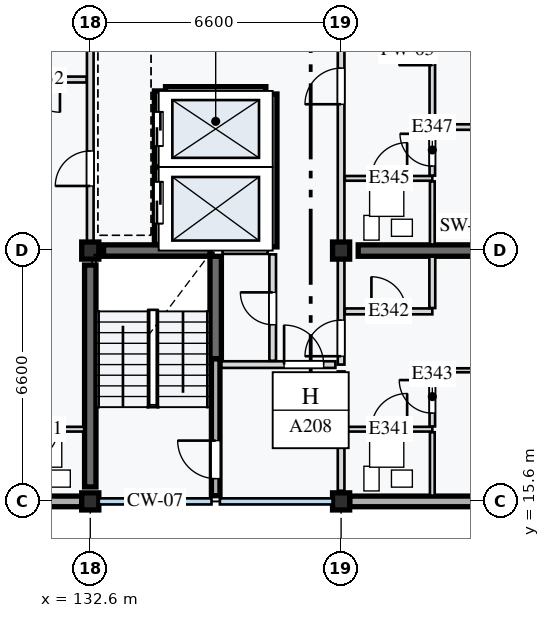
"""IFC4 building model, lengths in metres.
Left out: names, types, materials, properties, quantities, classifications, styles, units other than length and angle.
Written with IfcOpenShell. Run it as: python <this file> out.ifc"""

import sys

from ifc_helpers import new_model, si_unit, direction, frame, frame_2d, origin, origin_2d, place, context, subcontext, project, spatial, rectangle, extrude, element, fill, save


model = new_model("IFC4")
c1 = context("Model", 3, precision=1e-05, world=origin(), true_north=direction((0.0, 1.0)))
c2 = subcontext(c1, "Body", "Model", "MODEL_VIEW")
j1 = project(units=[si_unit("LENGTHUNIT", "METRE"), si_unit("PLANEANGLEUNIT", "RADIAN")], contexts=[c1])
p1 = place(None, origin())
s1 = spatial("IfcSite", under=j1, at=p1, CompositionType="ELEMENT")
p2 = place(p1, origin())
s2 = spatial("IfcBuilding", under=s1, at=p2, CompositionType="ELEMENT")
p3 = place(p2, frame((0.0, 0.0, 27.6)))
s3 = spatial("IfcBuildingStorey", under=s2, at=p3, CompositionType="ELEMENT", Elevation=27.6)
for number, where, z_axis, x_axis in (
    (1, (132.6, 15.6, 0.0), (0.0, 0.0, 1.0), (1.0, 0.0, 0.0)),
    (2, (139.2, 15.6, 0.0), (0.0, 0.0, 1.0), (1.0, 0.0, 0.0)),
    (3, (132.6, 22.2, 0.0), (0.0, 0.0, 1.0), (1.0, 0.0, 0.0)),
    (4, (139.2, 22.2, 0.0), (0.0, 0.0, 1.0), (1.0, 0.0, 0.0)),
):
    element("IfcColumn", number, at=place(p3, frame(where, z_axis=z_axis, x_axis=x_axis)), inside=s3, PredefinedType="COLUMN", context=c2, shape_type="SweptSolid", body=[
        extrude(rectangle(XDim=0.45, YDim=0.45, at=origin_2d()), origin(), (0.0, 0.0, 1.0), 3.2),
    ])
p4 = place(p3, frame((132.6, 15.98, 0.0), z_axis=(0.0, 0.0, 1.0), x_axis=(0.0, 1.0, 0.0)))
e5 = element("IfcWall", 5, at=p4, inside=s3, PredefinedType="SHEAR", context=c2, shape_type="SweptSolid", body=[
    extrude(rectangle(XDim=5.84, YDim=0.3, at=frame_2d((2.92, 0.0))), origin(), (0.0, 0.0, 1.0), 2.97),
])
p5 = place(p3, frame((135.9, 19.35, 0.0), z_axis=(0.0, 0.0, 1.0), x_axis=(0.0, 1.0, 0.0)))
e6 = element("IfcWall", 6, at=p5, inside=s3, PredefinedType="SHEAR", context=c2, shape_type="SweptSolid", body=[
    extrude(rectangle(XDim=2.7, YDim=0.3, at=frame_2d((1.35, 0.0))), origin(), (0.0, 0.0, 1.0), 2.97),
])
p6 = place(p3, frame((132.95, 22.2, 0.0), z_axis=(0.0, 0.0, 1.0), x_axis=(1.0, 0.0, 0.0)))
e7 = element("IfcWall", 7, at=p6, inside=s3, PredefinedType="SHEAR", context=c2, shape_type="SweptSolid", body=[
    extrude(rectangle(XDim=2.8, YDim=0.3, at=frame_2d((1.4, 0.0))), origin(), (0.0, 0.0, 1.0), 2.97),
])
p7 = place(p3, frame((139.65, 22.2, 0.0), z_axis=(0.0, 0.0, 1.0), x_axis=(1.0, 0.0, 0.0)))
e8 = element("IfcWall", 8, at=p7, inside=s3, PredefinedType="SHEAR", context=c2, shape_type="SweptSolid", body=[
    extrude(rectangle(XDim=5.7, YDim=0.3, at=frame_2d((2.85, 0.0))), origin(), (0.0, 0.0, 1.0), 2.97),
])
for number, where, z_axis, x_axis in (
    (9, (126.225, 15.6, 0.0), (0.0, 0.0, 1.0), (1.0, 0.0, 0.0)),
    (10, (139.425, 15.6, 0.0), (0.0, 0.0, 1.0), (1.0, 0.0, 0.0)),
):
    element("IfcWall", number, at=place(p3, frame(where, z_axis=z_axis, x_axis=x_axis)), inside=s3, PredefinedType="STANDARD", context=c2, shape_type="SweptSolid", body=[
        extrude(rectangle(XDim=6.15, YDim=0.28, at=frame_2d((3.075, 0.0))), origin(), (0.0, 0.0, 1.0), 2.65),
    ])
p8 = place(p3, frame((135.9, 15.75, 0.0), z_axis=(0.0, 0.0, 1.0), x_axis=(0.0, 1.0, 0.0)))
e11 = element("IfcWall", 11, at=p8, inside=s3, PredefinedType="STANDARD", context=c2, shape_type="SweptSolid", body=[
    extrude(rectangle(XDim=3.6, YDim=0.225, at=frame_2d((1.8, 0.0))), origin(), (0.0, 0.0, 1.0), 2.97),
])
p9 = place(p8, frame((0.45, 0.0, 0.0)))
e12 = element("IfcOpeningElement", 12, at=p9, cuts=e11, PredefinedType="OPENING", context=c2, shape_type="SweptSolid", body=[
    extrude(rectangle(XDim=1.0, YDim=2.16, at=frame_2d((0.5, 1.08))), frame((0.0, 0.123, 0.0), z_axis=(0.0, -1.0, 0.0), x_axis=(1.0, 0.0, 0.0)), (0.0, 0.0, 1.0), 0.245),
])
p10 = place(p3, frame((136.05, 19.2, 0.0), z_axis=(0.0, 0.0, 1.0), x_axis=(1.0, 0.0, 0.0)))
e13 = element("IfcWall", 13, at=p10, inside=s3, PredefinedType="PARTITIONING", context=c2, shape_type="SweptSolid", body=[
    extrude(rectangle(XDim=3.0, YDim=0.175, at=frame_2d((1.5, 0.0))), origin(), (0.0, 0.0, 1.0), 2.97),
])
p11 = place(p10, frame((1.65, 0.0, 0.0)))
e14 = element("IfcOpeningElement", 14, at=p11, cuts=e13, PredefinedType="OPENING", context=c2, shape_type="SweptSolid", body=[
    extrude(rectangle(XDim=1.04, YDim=2.12, at=frame_2d((0.52, 1.06))), frame((0.0, 0.097, 0.0), z_axis=(0.0, -1.0, 0.0), x_axis=(1.0, 0.0, 0.0)), (0.0, 0.0, 1.0), 0.195),
])
p12 = place(p3, frame((137.4, 19.3, 0.0), z_axis=(0.0, 0.0, 1.0), x_axis=(0.0, 1.0, 0.0)))
e15 = element("IfcWall", 15, at=p12, inside=s3, PredefinedType="PARTITIONING", context=c2, shape_type="SweptSolid", body=[
    extrude(rectangle(XDim=2.8, YDim=0.175, at=frame_2d((1.4, 0.0))), origin(), (0.0, 0.0, 1.0), 2.97),
])
p13 = place(p12, frame((0.95, 0.0, 0.0)))
e16 = element("IfcOpeningElement", 16, at=p13, cuts=e15, PredefinedType="OPENING", context=c2, shape_type="SweptSolid", body=[
    extrude(rectangle(XDim=0.85, YDim=2.0, at=frame_2d((0.425, 1.0))), frame((0.0, 0.097, 0.0), z_axis=(0.0, -1.0, 0.0), x_axis=(1.0, 0.0, 0.0)), (0.0, 0.0, 1.0), 0.195),
])
p14 = place(p3, frame((136.08, 22.2, 0.0), z_axis=(0.0, 0.0, 1.0), x_axis=(1.0, 0.0, 0.0)))
e17 = element("IfcWall", 17, at=p14, inside=s3, PredefinedType="PARTITIONING", context=c2, shape_type="SweptSolid", body=[
    extrude(rectangle(XDim=1.19, YDim=0.175, at=frame_2d((0.595, 0.0))), origin(), (0.0, 0.0, 1.0), 2.97),
])
p15 = place(p3, frame((134.4, 22.36, 0.0), z_axis=(0.0, 0.0, 1.0), x_axis=(0.0, 1.0, 0.0)))
e18 = element("IfcWall", 18, at=p15, inside=s3, PredefinedType="STANDARD", context=c2, shape_type="SweptSolid", body=[
    extrude(rectangle(XDim=2.04, YDim=0.225, at=frame_2d((1.02, 0.0))), origin(), (0.0, 0.0, 1.0), 2.97),
])
p16 = place(p15, frame((0.55, 0.0, 0.0)))
e19 = element("IfcOpeningElement", 19, at=p16, cuts=e18, PredefinedType="OPENING", context=c2, shape_type="SweptSolid", body=[
    extrude(rectangle(XDim=1.1, YDim=2.1, at=frame_2d((0.55, 1.05))), frame((0.0, 0.123, 0.0), z_axis=(0.0, -1.0, 0.0), x_axis=(1.0, 0.0, 0.0)), (0.0, 0.0, 1.0), 0.245),
])
p17 = place(p3, frame((134.4, 24.4, 0.0), z_axis=(0.0, 0.0, 1.0), x_axis=(0.0, 1.0, 0.0)))
e20 = element("IfcWall", 20, at=p17, inside=s3, PredefinedType="STANDARD", context=c2, shape_type="SweptSolid", body=[
    extrude(rectangle(XDim=2.0, YDim=0.225, at=frame_2d((1.0, 0.0))), origin(), (0.0, 0.0, 1.0), 2.97),
])
p18 = place(p17, frame((0.55, 0.0, 0.0)))
e21 = element("IfcOpeningElement", 21, at=p18, cuts=e20, PredefinedType="OPENING", context=c2, shape_type="SweptSolid", body=[
    extrude(rectangle(XDim=0.9, YDim=2.1, at=frame_2d((0.45, 1.05))), frame((0.0, 0.123, 0.0), z_axis=(0.0, -1.0, 0.0), x_axis=(1.0, 0.0, 0.0)), (0.0, 0.0, 1.0), 0.245),
])
p19 = place(p3, frame((137.4, 22.298, 0.0), z_axis=(0.0, 0.0, 1.0), x_axis=(0.0, 1.0, 0.0)))
e22 = element("IfcWall", 22, at=p19, inside=s3, PredefinedType="STANDARD", context=c2, shape_type="SweptSolid", body=[
    extrude(rectangle(XDim=4.022, YDim=0.225, at=frame_2d((2.011, 0.0))), origin(), (0.0, 0.0, 1.0), 2.97),
])
for number, where, z_axis, x_axis in (
    (23, (134.58, 24.4, 0.0), (0.0, 0.0, 1.0), (1.0, 0.0, 0.0)),
    (24, (134.58, 26.4, 0.0), (0.0, 0.0, 1.0), (1.0, 0.0, 0.0)),
):
    element("IfcWall", number, at=place(p3, frame(where, z_axis=z_axis, x_axis=x_axis)), inside=s3, PredefinedType="STANDARD", context=c2, shape_type="SweptSolid", body=[
        extrude(rectangle(XDim=2.64, YDim=0.225, at=frame_2d((1.32, 0.0))), origin(), (0.0, 0.0, 1.0), 2.97),
    ])
p20 = place(p3, frame((132.6, 22.2, 0.0), z_axis=(0.0, 0.0, 1.0), x_axis=(0.0, 1.0, 0.0)))
e25 = element("IfcWall", 25, at=p20, inside=s3, PredefinedType="PARTITIONING", context=c2, shape_type="SweptSolid", body=[
    extrude(rectangle(XDim=6.6, YDim=0.175, at=frame_2d((3.3, 0.0))), origin(), (0.0, 0.0, 1.0), 2.55),
])
p21 = place(p20, frame((1.7, 0.0, 0.0)))
e26 = element("IfcOpeningElement", 26, at=p21, cuts=e25, PredefinedType="OPENING", context=c2, shape_type="SweptSolid", body=[
    extrude(rectangle(XDim=0.92, YDim=2.14, at=frame_2d((0.46, 1.07))), frame((0.0, 0.097, 0.0), z_axis=(0.0, -1.0, 0.0), x_axis=(1.0, 0.0, 0.0)), (0.0, 0.0, 1.0), 0.195),
])
p22 = place(p3, frame((132.44, 17.5, 0.0), z_axis=(0.0, 0.0, 1.0), x_axis=(-1.0, 0.0, 0.0)))
e27 = element("IfcWall", 27, at=p22, inside=s3, PredefinedType="PARTITIONING", context=c2, shape_type="SweptSolid", body=[
    extrude(rectangle(XDim=2.24, YDim=0.125, at=frame_2d((1.12, 0.0))), origin(), (0.0, 0.0, 1.0), 2.97),
])
p23 = place(p22, frame((0.7, 0.0, 0.0)))
e28 = element("IfcOpeningElement", 28, at=p23, cuts=e27, PredefinedType="OPENING", context=c2, shape_type="SweptSolid", body=[
    extrude(rectangle(XDim=0.82, YDim=2.05, at=frame_2d((0.41, 1.025))), frame((0.0, 0.073, 0.0), z_axis=(0.0, -1.0, 0.0), x_axis=(1.0, 0.0, 0.0)), (0.0, 0.0, 1.0), 0.145),
])
p24 = place(p3, frame((132.502, 26.7, 0.0), z_axis=(0.0, 0.0, 1.0), x_axis=(-1.0, 0.0, 0.0)))
e29 = element("IfcWall", 29, at=p24, inside=s3, PredefinedType="PARTITIONING", context=c2, shape_type="SweptSolid", body=[
    extrude(rectangle(XDim=2.302, YDim=0.155, at=frame_2d((1.151, 0.0))), origin(), (0.0, 0.0, 1.0), 2.97),
])
p25 = place(p24, frame((0.7, 0.0, 0.0)))
e30 = element("IfcOpeningElement", 30, at=p25, cuts=e29, PredefinedType="OPENING", context=c2, shape_type="SweptSolid", body=[
    extrude(rectangle(XDim=0.86, YDim=2.12, at=frame_2d((0.43, 1.06))), frame((0.0, 0.087, 0.0), z_axis=(0.0, -1.0, 0.0), x_axis=(1.0, 0.0, 0.0)), (0.0, 0.0, 1.0), 0.175),
])
p26 = place(p3, frame((139.2, 15.88, 0.0), z_axis=(0.0, 0.0, 1.0), x_axis=(0.0, 1.0, 0.0)))
e31 = element("IfcWall", 31, at=p26, inside=s3, PredefinedType="PARTITIONING", context=c2, shape_type="SweptSolid", body=[
    extrude(rectangle(XDim=3.14, YDim=0.175, at=frame_2d((1.57, 0.0))), origin(), (0.0, 0.0, 1.0), 2.55),
])
p27 = place(p3, frame((139.2, 19.2, 0.0), z_axis=(0.0, 0.0, 1.0), x_axis=(0.0, 1.0, 0.0)))
e32 = element("IfcWall", 32, at=p27, inside=s3, PredefinedType="PARTITIONING", context=c2, shape_type="SweptSolid", body=[
    extrude(rectangle(XDim=3.0, YDim=0.175, at=frame_2d((1.5, 0.0))), origin(), (0.0, 0.0, 1.0), 2.55),
])
p28 = place(p27, frame((0.22, 0.0, 0.0)))
e33 = element("IfcOpeningElement", 33, at=p28, cuts=e32, PredefinedType="OPENING", context=c2, shape_type="SweptSolid", body=[
    extrude(rectangle(XDim=0.95, YDim=2.1, at=frame_2d((0.475, 1.05))), frame((0.0, 0.097, 0.0), z_axis=(0.0, -1.0, 0.0), x_axis=(1.0, 0.0, 0.0)), (0.0, 0.0, 1.0), 0.195),
])
p29 = place(p3, frame((139.298, 17.5, 0.0), z_axis=(0.0, 0.0, 1.0), x_axis=(1.0, 0.0, 0.0)))
e34 = element("IfcWall", 34, at=p29, inside=s3, PredefinedType="PARTITIONING", context=c2, shape_type="SweptSolid", body=[
    extrude(rectangle(XDim=2.302, YDim=0.125, at=frame_2d((1.151, 0.0))), origin(), (0.0, 0.0, 1.0), 2.97),
])
p30 = place(p29, frame((0.7, 0.0, 0.0)))
e35 = element("IfcOpeningElement", 35, at=p30, cuts=e34, PredefinedType="OPENING", context=c2, shape_type="SweptSolid", body=[
    extrude(rectangle(XDim=0.94, YDim=2.08, at=frame_2d((0.47, 1.04))), frame((0.0, 0.073, 0.0), z_axis=(0.0, -1.0, 0.0), x_axis=(1.0, 0.0, 0.0)), (0.0, 0.0, 1.0), 0.145),
])
p31 = place(p3, frame((141.6, 15.75, 0.0), z_axis=(0.0, 0.0, 1.0), x_axis=(0.0, 1.0, 0.0)))
e36 = element("IfcWall", 36, at=p31, inside=s3, PredefinedType="PARTITIONING", context=c2, shape_type="SweptSolid", body=[
    extrude(rectangle(XDim=1.67, YDim=0.125, at=frame_2d((0.835, 0.0))), origin(), (0.0, 0.0, 1.0), 2.97),
])
p32 = place(p3, frame((139.298, 20.6, 0.0), z_axis=(0.0, 0.0, 1.0), x_axis=(1.0, 0.0, 0.0)))
e37 = element("IfcWall", 37, at=p32, inside=s3, PredefinedType="PARTITIONING", context=c2, shape_type="SweptSolid", body=[
    extrude(rectangle(XDim=2.302, YDim=0.155, at=frame_2d((1.151, 0.0))), origin(), (0.0, 0.0, 1.0), 2.97),
])
p33 = place(p32, frame((0.7, 0.0, 0.0)))
e38 = element("IfcOpeningElement", 38, at=p33, cuts=e37, PredefinedType="OPENING", context=c2, shape_type="SweptSolid", body=[
    extrude(rectangle(XDim=0.91, YDim=2.14, at=frame_2d((0.455, 1.07))), frame((0.0, 0.087, 0.0), z_axis=(0.0, -1.0, 0.0), x_axis=(1.0, 0.0, 0.0)), (0.0, 0.0, 1.0), 0.175),
])
p34 = place(p3, frame((141.6, 20.688, 0.0), z_axis=(0.0, 0.0, 1.0), x_axis=(0.0, 1.0, 0.0)))
e39 = element("IfcWall", 39, at=p34, inside=s3, PredefinedType="PARTITIONING", context=c2, shape_type="SweptSolid", body=[
    extrude(rectangle(XDim=1.353, YDim=0.155, at=frame_2d((0.676, 0.0))), origin(), (0.0, 0.0, 1.0), 2.97),
])
p35 = place(p3, frame((141.6, 17.573, 0.0), z_axis=(0.0, 0.0, 1.0), x_axis=(0.0, 1.0, 0.0)))
e40 = element("IfcWall", 40, at=p35, inside=s3, PredefinedType="PARTITIONING", context=c2, shape_type="SweptSolid", body=[
    extrude(rectangle(XDim=1.478, YDim=0.145, at=frame_2d((0.739, 0.0))), origin(), (0.0, 0.0, 1.0), 2.97),
])
p36 = place(p35, frame((0.35, 0.0, 0.0)))
e41 = element("IfcOpeningElement", 41, at=p36, cuts=e40, PredefinedType="OPENING", context=c2, shape_type="SweptSolid", body=[
    extrude(rectangle(XDim=0.87, YDim=2.08, at=frame_2d((0.435, 1.04))), frame((0.0, 0.083, 0.0), z_axis=(0.0, -1.0, 0.0), x_axis=(1.0, 0.0, 0.0)), (0.0, 0.0, 1.0), 0.165),
])
p37 = place(p3, frame((141.683, 19.05, 0.0), z_axis=(0.0, 0.0, 1.0), x_axis=(1.0, 0.0, 0.0)))
e42 = element("IfcWall", 42, at=p37, inside=s3, PredefinedType="PARTITIONING", context=c2, shape_type="SweptSolid", body=[
    extrude(rectangle(XDim=3.967, YDim=0.105, at=frame_2d((1.984, 0.0))), origin(), (0.0, 0.0, 1.0), 2.97),
])
p38 = place(p3, frame((139.2, 22.2, 0.0), z_axis=(0.0, 0.0, 1.0), x_axis=(0.0, 1.0, 0.0)))
e43 = element("IfcWall", 43, at=p38, inside=s3, PredefinedType="PARTITIONING", context=c2, shape_type="SweptSolid", body=[
    extrude(rectangle(XDim=6.6, YDim=0.175, at=frame_2d((3.3, 0.0))), origin(), (0.0, 0.0, 1.0), 2.55),
])
p39 = place(p38, frame((3.85, 0.0, 0.0)))
e44 = element("IfcOpeningElement", 44, at=p39, cuts=e43, PredefinedType="OPENING", context=c2, shape_type="SweptSolid", body=[
    extrude(rectangle(XDim=0.95, YDim=2.1, at=frame_2d((0.475, 1.05))), frame((0.0, 0.097, 0.0), z_axis=(0.0, -1.0, 0.0), x_axis=(1.0, 0.0, 0.0)), (0.0, 0.0, 1.0), 0.195),
])
p40 = place(p3, frame((139.298, 24.1, 0.0), z_axis=(0.0, 0.0, 1.0), x_axis=(1.0, 0.0, 0.0)))
e45 = element("IfcWall", 45, at=p40, inside=s3, PredefinedType="PARTITIONING", context=c2, shape_type="SweptSolid", body=[
    extrude(rectangle(XDim=2.302, YDim=0.125, at=frame_2d((1.151, 0.0))), origin(), (0.0, 0.0, 1.0), 2.97),
])
p41 = place(p40, frame((0.7, 0.0, 0.0)))
e46 = element("IfcOpeningElement", 46, at=p41, cuts=e45, PredefinedType="OPENING", context=c2, shape_type="SweptSolid", body=[
    extrude(rectangle(XDim=0.94, YDim=2.08, at=frame_2d((0.47, 1.04))), frame((0.0, 0.073, 0.0), z_axis=(0.0, -1.0, 0.0), x_axis=(1.0, 0.0, 0.0)), (0.0, 0.0, 1.0), 0.145),
])
p42 = place(p3, frame((141.6, 22.36, 0.0), z_axis=(0.0, 0.0, 1.0), x_axis=(0.0, 1.0, 0.0)))
e47 = element("IfcWall", 47, at=p42, inside=s3, PredefinedType="PARTITIONING", context=c2, shape_type="SweptSolid", body=[
    extrude(rectangle(XDim=1.66, YDim=0.125, at=frame_2d((0.83, 0.0))), origin(), (0.0, 0.0, 1.0), 2.97),
])
p43 = place(p3, frame((141.6, 24.173, 0.0), z_axis=(0.0, 0.0, 1.0), x_axis=(0.0, 1.0, 0.0)))
e48 = element("IfcWall", 48, at=p43, inside=s3, PredefinedType="PARTITIONING", context=c2, shape_type="SweptSolid", body=[
    extrude(rectangle(XDim=1.277, YDim=0.145, at=frame_2d((0.639, 0.0))), origin(), (0.0, 0.0, 1.0), 2.97),
])
p44 = place(p43, frame((0.25, 0.0, 0.0)))
e49 = element("IfcOpeningElement", 49, at=p44, cuts=e48, PredefinedType="OPENING", context=c2, shape_type="SweptSolid", body=[
    extrude(rectangle(XDim=0.85, YDim=2.1, at=frame_2d((0.425, 1.05))), frame((0.0, 0.083, 0.0), z_axis=(0.0, -1.0, 0.0), x_axis=(1.0, 0.0, 0.0)), (0.0, 0.0, 1.0), 0.165),
])
p45 = place(p3, frame((141.683, 25.45, 0.0), z_axis=(0.0, 0.0, 1.0), x_axis=(1.0, 0.0, 0.0)))
e50 = element("IfcWall", 50, at=p45, inside=s3, PredefinedType="PARTITIONING", context=c2, shape_type="SweptSolid", body=[
    extrude(rectangle(XDim=3.967, YDim=0.145, at=frame_2d((1.984, 0.0))), origin(), (0.0, 0.0, 1.0), 2.97),
])
p46 = place(p3, frame((141.6, 25.532, 0.0), z_axis=(0.0, 0.0, 1.0), x_axis=(0.0, 1.0, 0.0)))
e51 = element("IfcWall", 51, at=p46, inside=s3, PredefinedType="PARTITIONING", context=c2, shape_type="SweptSolid", body=[
    extrude(rectangle(XDim=3.86, YDim=0.145, at=frame_2d((1.93, 0.0))), origin(), (0.0, 0.0, 1.0), 2.97),
])
p47 = place(p46, frame((1.546, 0.0, 0.0)))
e52 = element("IfcOpeningElement", 52, at=p47, cuts=e51, PredefinedType="OPENING", context=c2, shape_type="SweptSolid", body=[
    extrude(rectangle(XDim=0.88, YDim=2.1, at=frame_2d((0.44, 1.05))), frame((0.0, 0.083, 0.0), z_axis=(0.0, -1.0, 0.0), x_axis=(1.0, 0.0, 0.0)), (0.0, 0.0, 1.0), 0.165),
])
p48 = place(p9, origin())
e53 = element("IfcDoor", 53, at=p48, inside=s3, OperationType="SINGLE_SWING_RIGHT", PredefinedType="DOOR", context=c2, shape_type="SweptSolid", body=[
    extrude(rectangle(XDim=1.0, YDim=2.16, at=frame_2d((0.5, 1.08))), frame((0.0, 0.025, 0.0), z_axis=(0.0, -1.0, 0.0), x_axis=(1.0, 0.0, 0.0)), (0.0, 0.0, 1.0), 0.05),
])
fill(e12, e53)
p49 = place(p11, origin())
e54 = element("IfcDoor", 54, at=p49, inside=s3, OperationType="SINGLE_SWING_LEFT", PredefinedType="DOOR", context=c2, shape_type="SweptSolid", body=[
    extrude(rectangle(XDim=1.04, YDim=2.12, at=frame_2d((0.52, 1.06))), frame((0.0, 0.025, 0.0), z_axis=(0.0, -1.0, 0.0), x_axis=(1.0, 0.0, 0.0)), (0.0, 0.0, 1.0), 0.05),
])
fill(e14, e54)
p50 = place(p13, origin())
e55 = element("IfcDoor", 55, at=p50, inside=s3, OperationType="SINGLE_SWING_RIGHT", PredefinedType="DOOR", context=c2, shape_type="SweptSolid", body=[
    extrude(rectangle(XDim=0.85, YDim=2.0, at=frame_2d((0.425, 1.0))), frame((0.0, 0.025, 0.0), z_axis=(0.0, -1.0, 0.0), x_axis=(1.0, 0.0, 0.0)), (0.0, 0.0, 1.0), 0.05),
])
fill(e16, e55)
p51 = place(p16, origin())
e56 = element("IfcDoor", 56, at=p51, inside=s3, OperationType="DOUBLE_DOOR_SLIDING", PredefinedType="DOOR", context=c2, shape_type="SweptSolid", body=[
    extrude(rectangle(XDim=1.1, YDim=2.1, at=frame_2d((0.55, 1.05))), frame((0.0, 0.025, 0.0), z_axis=(0.0, -1.0, 0.0), x_axis=(1.0, 0.0, 0.0)), (0.0, 0.0, 1.0), 0.05),
])
fill(e19, e56)
p52 = place(p18, origin())
e57 = element("IfcDoor", 57, at=p52, inside=s3, OperationType="DOUBLE_DOOR_SLIDING", PredefinedType="DOOR", context=c2, shape_type="SweptSolid", body=[
    extrude(rectangle(XDim=0.9, YDim=2.1, at=frame_2d((0.45, 1.05))), frame((0.0, 0.025, 0.0), z_axis=(0.0, -1.0, 0.0), x_axis=(1.0, 0.0, 0.0)), (0.0, 0.0, 1.0), 0.05),
])
fill(e21, e57)
p53 = place(p21, origin())
e58 = element("IfcDoor", 58, at=p53, inside=s3, OperationType="SINGLE_SWING_LEFT", PredefinedType="DOOR", context=c2, shape_type="SweptSolid", body=[
    extrude(rectangle(XDim=0.92, YDim=2.14, at=frame_2d((0.46, 1.07))), frame((0.0, 0.025, 0.0), z_axis=(0.0, -1.0, 0.0), x_axis=(1.0, 0.0, 0.0)), (0.0, 0.0, 1.0), 0.05),
])
fill(e26, e58)
p54 = place(p23, origin())
e59 = element("IfcDoor", 59, at=p54, inside=s3, OperationType="SINGLE_SWING_RIGHT", PredefinedType="DOOR", context=c2, shape_type="SweptSolid", body=[
    extrude(rectangle(XDim=0.82, YDim=2.05, at=frame_2d((0.41, 1.025))), frame((0.0, 0.025, 0.0), z_axis=(0.0, -1.0, 0.0), x_axis=(1.0, 0.0, 0.0)), (0.0, 0.0, 1.0), 0.05),
])
fill(e28, e59)
p55 = place(p25, origin())
e60 = element("IfcDoor", 60, at=p55, inside=s3, OperationType="SINGLE_SWING_LEFT", PredefinedType="DOOR", context=c2, shape_type="SweptSolid", body=[
    extrude(rectangle(XDim=0.86, YDim=2.12, at=frame_2d((0.43, 1.06))), frame((0.0, 0.025, 0.0), z_axis=(0.0, -1.0, 0.0), x_axis=(1.0, 0.0, 0.0)), (0.0, 0.0, 1.0), 0.05),
])
fill(e30, e60)
p56 = place(p28, origin())
e61 = element("IfcDoor", 61, at=p56, inside=s3, OperationType="SINGLE_SWING_LEFT", PredefinedType="DOOR", context=c2, shape_type="SweptSolid", body=[
    extrude(rectangle(XDim=0.95, YDim=2.1, at=frame_2d((0.475, 1.05))), frame((0.0, 0.025, 0.0), z_axis=(0.0, -1.0, 0.0), x_axis=(1.0, 0.0, 0.0)), (0.0, 0.0, 1.0), 0.05),
])
fill(e33, e61)
p57 = place(p30, origin())
e62 = element("IfcDoor", 62, at=p57, inside=s3, OperationType="SINGLE_SWING_RIGHT", PredefinedType="DOOR", context=c2, shape_type="SweptSolid", body=[
    extrude(rectangle(XDim=0.94, YDim=2.08, at=frame_2d((0.47, 1.04))), frame((0.0, 0.025, 0.0), z_axis=(0.0, -1.0, 0.0), x_axis=(1.0, 0.0, 0.0)), (0.0, 0.0, 1.0), 0.05),
])
fill(e35, e62)
p58 = place(p33, origin())
e63 = element("IfcDoor", 63, at=p58, inside=s3, OperationType="SINGLE_SWING_LEFT", PredefinedType="DOOR", context=c2, shape_type="SweptSolid", body=[
    extrude(rectangle(XDim=0.91, YDim=2.14, at=frame_2d((0.455, 1.07))), frame((0.0, 0.025, 0.0), z_axis=(0.0, -1.0, 0.0), x_axis=(1.0, 0.0, 0.0)), (0.0, 0.0, 1.0), 0.05),
])
fill(e38, e63)
p59 = place(p36, origin())
e64 = element("IfcDoor", 64, at=p59, inside=s3, OperationType="SINGLE_SWING_RIGHT", PredefinedType="DOOR", context=c2, shape_type="SweptSolid", body=[
    extrude(rectangle(XDim=0.87, YDim=2.08, at=frame_2d((0.435, 1.04))), frame((0.0, 0.025, 0.0), z_axis=(0.0, -1.0, 0.0), x_axis=(1.0, 0.0, 0.0)), (0.0, 0.0, 1.0), 0.05),
])
fill(e41, e64)
p60 = place(p39, origin())
e65 = element("IfcDoor", 65, at=p60, inside=s3, OperationType="SINGLE_SWING_LEFT", PredefinedType="DOOR", context=c2, shape_type="SweptSolid", body=[
    extrude(rectangle(XDim=0.95, YDim=2.1, at=frame_2d((0.475, 1.05))), frame((0.0, 0.025, 0.0), z_axis=(0.0, -1.0, 0.0), x_axis=(1.0, 0.0, 0.0)), (0.0, 0.0, 1.0), 0.05),
])
fill(e44, e65)
p61 = place(p41, origin())
e66 = element("IfcDoor", 66, at=p61, inside=s3, OperationType="SINGLE_SWING_RIGHT", PredefinedType="DOOR", context=c2, shape_type="SweptSolid", body=[
    extrude(rectangle(XDim=0.94, YDim=2.08, at=frame_2d((0.47, 1.04))), frame((0.0, 0.025, 0.0), z_axis=(0.0, -1.0, 0.0), x_axis=(1.0, 0.0, 0.0)), (0.0, 0.0, 1.0), 0.05),
])
fill(e46, e66)
p62 = place(p44, origin())
e67 = element("IfcDoor", 67, at=p62, inside=s3, OperationType="SINGLE_SWING_RIGHT", PredefinedType="DOOR", context=c2, shape_type="SweptSolid", body=[
    extrude(rectangle(XDim=0.85, YDim=2.1, at=frame_2d((0.425, 1.05))), frame((0.0, 0.025, 0.0), z_axis=(0.0, -1.0, 0.0), x_axis=(1.0, 0.0, 0.0)), (0.0, 0.0, 1.0), 0.05),
])
fill(e49, e67)
p63 = place(p47, origin())
e68 = element("IfcDoor", 68, at=p63, inside=s3, OperationType="SINGLE_SWING_LEFT", PredefinedType="DOOR", context=c2, shape_type="SweptSolid", body=[
    extrude(rectangle(XDim=0.88, YDim=2.1, at=frame_2d((0.44, 1.05))), frame((0.0, 0.025, 0.0), z_axis=(0.0, -1.0, 0.0), x_axis=(1.0, 0.0, 0.0)), (0.0, 0.0, 1.0), 0.05),
])
fill(e52, e68)
save(model, sys.argv[1])
